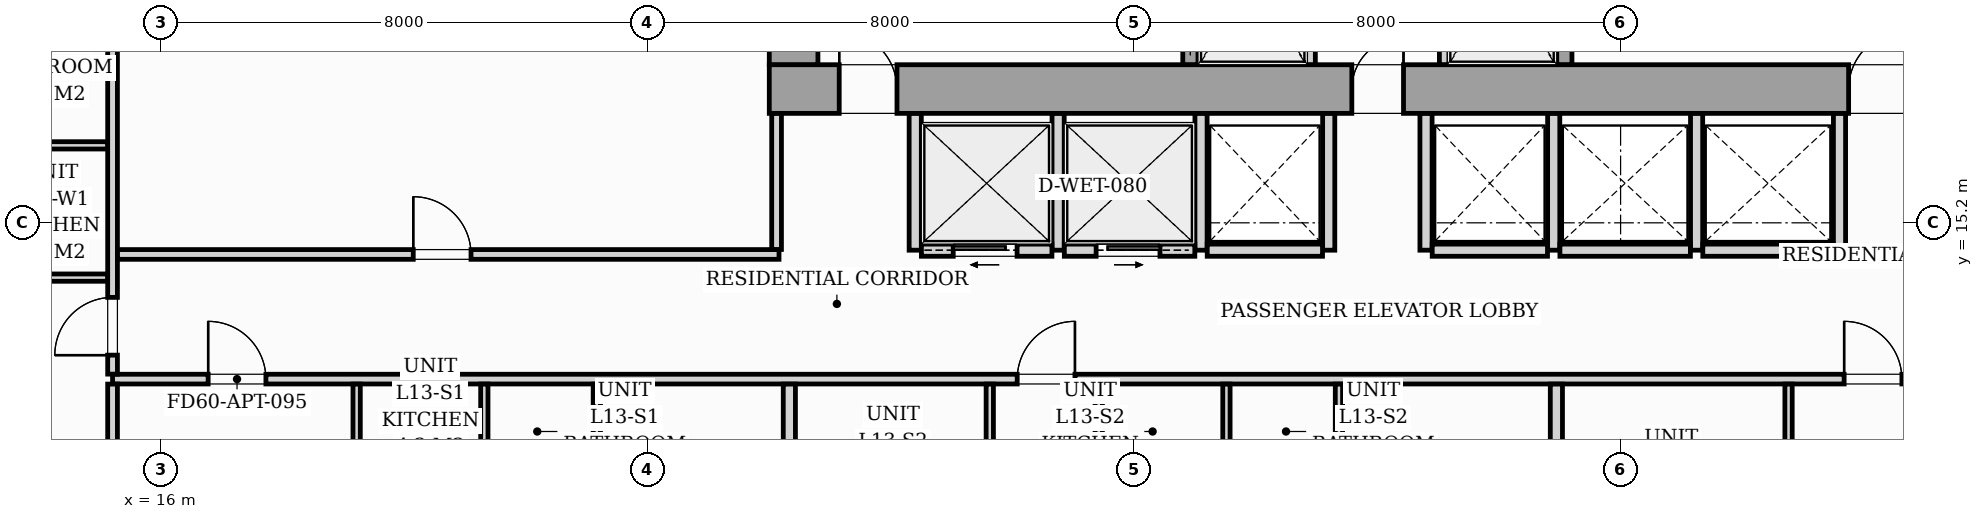
"""IFC4 building model, lengths in metres.
Left out: names, types, materials, properties, quantities, classifications, styles, units other than length and angle.
Written with IfcOpenShell. Run it as: python <this file> out.ifc"""

import sys

from ifc_helpers import new_model, si_unit, direction, frame, frame_2d, origin, origin_2d, place, context, subcontext, project, spatial, rectangle, i_section, extrude, source, transform, mapped, element, fill, save


model = new_model("IFC4")
c1 = context("Model", 3, precision=1e-05, world=origin(), true_north=direction((0.0, 1.0)))
c2 = subcontext(c1, "Body", "Model", "MODEL_VIEW")
j1 = project(units=[si_unit("LENGTHUNIT", "METRE"), si_unit("PLANEANGLEUNIT", "RADIAN")], contexts=[c1])
p1 = place(None, origin())
s1 = spatial("IfcSite", under=j1, at=p1, CompositionType="ELEMENT")
p2 = place(p1, origin())
s2 = spatial("IfcBuilding", under=s1, at=p2, CompositionType="ELEMENT")
p3 = place(p2, frame((0.0, 0.0, 48.6)))
s3 = spatial("IfcBuildingStorey", under=s2, at=p3, CompositionType="ELEMENT", Elevation=48.6)
m1 = source(origin(), c2, "Body", "SweptSolid", [
    extrude(i_section(OverallWidth=0.437, OverallDepth=0.514, WebThickness=0.061, FlangeThickness=0.097, FilletRadius=0.018, at=origin_2d()), origin(), (0.0, 0.0, 1.0), 3.196),
])
for number, where, z_axis, x_axis in (
    (1, (26.4, 17.4, 0.002), (0.0, 0.0, 1.0), (1.0, 0.0, 0.0)),
    (2, (33.12, 17.4, 0.002), (0.0, 0.0, 1.0), (1.0, 0.0, 0.0)),
    (3, (38.88, 17.4, 0.002), (0.0, 0.0, 1.0), (1.0, 0.0, 0.0)),
):
    element("IfcColumn", number, at=place(p3, frame(where, z_axis=z_axis, x_axis=x_axis)), inside=s3, PredefinedType="PILASTER", context=c2, shape_type="MappedRepresentation", body=[
        mapped(m1, transform((0.0, 0.0, 0.0), scale=1.0)),
    ])
p4 = place(p3, frame((26.0, 17.4, 0.0), z_axis=(0.0, 0.0, 1.0), x_axis=(1.0, 0.0, 0.0)))
e4 = element("IfcWall", 4, at=p4, inside=s3, PredefinedType="SHEAR", context=c2, shape_type="SweptSolid", body=[
    extrude(rectangle(XDim=20.0, YDim=0.8, at=frame_2d((10.0, 0.0))), origin(), (0.0, 0.0, 1.0), 3.2),
])
p5 = place(p4, frame((1.15, 0.0, 0.0)))
e5 = element("IfcOpeningElement", 5, at=p5, cuts=e4, PredefinedType="OPENING", context=c2, shape_type="SweptSolid", body=[
    extrude(rectangle(XDim=0.95, YDim=2.06, at=frame_2d((0.475, 1.03))), frame((0.0, 0.41, 0.0), z_axis=(0.0, -1.0, 0.0), x_axis=(1.0, 0.0, 0.0)), (0.0, 0.0, 1.0), 0.82),
])
p6 = place(p4, frame((9.58, 0.0, 0.0)))
e6 = element("IfcOpeningElement", 6, at=p6, cuts=e4, PredefinedType="OPENING", context=c2, shape_type="SweptSolid", body=[
    extrude(rectangle(XDim=0.85, YDim=2.0, at=frame_2d((0.425, 1.0))), frame((0.0, 0.41, 0.0), z_axis=(0.0, -1.0, 0.0), x_axis=(1.0, 0.0, 0.0)), (0.0, 0.0, 1.0), 0.82),
])
p7 = place(p4, frame((17.75, 0.0, 0.0)))
e7 = element("IfcOpeningElement", 7, at=p7, cuts=e4, PredefinedType="OPENING", context=c2, shape_type="SweptSolid", body=[
    extrude(rectangle(XDim=0.95, YDim=2.06, at=frame_2d((0.475, 1.03))), frame((0.0, 0.41, 0.0), z_axis=(0.0, -1.0, 0.0), x_axis=(1.0, 0.0, 0.0)), (0.0, 0.0, 1.0), 0.82),
])
p8 = place(p3, frame((26.4, 17.802, 0.0), z_axis=(0.0, 0.0, 1.0), x_axis=(0.0, 1.0, 0.0)))
e8 = element("IfcWall", 8, at=p8, inside=s3, PredefinedType="SHEAR", context=c2, shape_type="SweptSolid", body=[
    extrude(rectangle(XDim=5.796, YDim=0.8, at=frame_2d((2.898, 0.0))), origin(), (0.0, 0.0, 1.0), 3.2),
])
p9 = place(p3, frame((32.925, 17.802, 0.0), z_axis=(0.0, 0.0, 1.0), x_axis=(0.0, 1.0, 0.0)))
e9 = element("IfcWall", 9, at=p9, inside=s3, PredefinedType="SOLIDWALL", context=c2, shape_type="SweptSolid", body=[
    extrude(rectangle(XDim=2.646, YDim=0.25, at=frame_2d((1.323, 0.0))), origin(), (0.0, 0.0, 1.0), 3.2),
])
p10 = place(p9, frame((0.648, 0.0, 0.0)))
e10 = element("IfcOpeningElement", 10, at=p10, cuts=e9, PredefinedType="OPENING", context=c2, shape_type="SweptSolid", body=[
    extrude(rectangle(XDim=1.1, YDim=2.08, at=frame_2d((0.55, 1.04))), frame((0.0, 0.135, 0.0), z_axis=(0.0, -1.0, 0.0), x_axis=(1.0, 0.0, 0.0)), (0.0, 0.0, 1.0), 0.27),
])
for number, where, z_axis, x_axis in (
    (11, (34.9, 17.802, 0.0), (0.0, 0.0, 1.0), (0.0, 1.0, 0.0)),
    (12, (37.1, 17.802, 0.0), (0.0, 0.0, 1.0), (0.0, 1.0, 0.0)),
):
    element("IfcWall", number, at=place(p3, frame(where, z_axis=z_axis, x_axis=x_axis)), inside=s3, PredefinedType="PARTITIONING", context=c2, shape_type="SweptSolid", body=[
        extrude(rectangle(XDim=2.646, YDim=0.16, at=frame_2d((1.323, 0.0))), origin(), (0.0, 0.0, 1.0), 2.94),
    ])
p11 = place(p3, frame((39.075, 17.802, 0.0), z_axis=(0.0, 0.0, 1.0), x_axis=(0.0, 1.0, 0.0)))
e13 = element("IfcWall", 13, at=p11, inside=s3, PredefinedType="SOLIDWALL", context=c2, shape_type="SweptSolid", body=[
    extrude(rectangle(XDim=2.646, YDim=0.25, at=frame_2d((1.323, 0.0))), origin(), (0.0, 0.0, 1.0), 3.2),
])
p12 = place(p11, frame((0.648, 0.0, 0.0)))
e14 = element("IfcOpeningElement", 14, at=p12, cuts=e13, PredefinedType="OPENING", context=c2, shape_type="SweptSolid", body=[
    extrude(rectangle(XDim=1.1, YDim=2.08, at=frame_2d((0.55, 1.04))), frame((0.0, 0.135, 0.0), z_axis=(0.0, -1.0, 0.0), x_axis=(1.0, 0.0, 0.0)), (0.0, 0.0, 1.0), 0.27),
])
for number, where, z_axis, x_axis in (
    (15, (28.4, 14.75, 0.0), (0.0, 0.0, 1.0), (0.0, 1.0, 0.0)),
    (16, (30.75, 14.75, 0.0), (0.0, 0.0, 1.0), (0.0, 1.0, 0.0)),
    (17, (33.1, 14.75, 0.0), (0.0, 0.0, 1.0), (0.0, 1.0, 0.0)),
):
    element("IfcWall", number, at=place(p3, frame(where, z_axis=z_axis, x_axis=x_axis)), inside=s3, PredefinedType="PARTITIONING", context=c2, shape_type="SweptSolid", body=[
        extrude(rectangle(XDim=2.248, YDim=0.2, at=frame_2d((1.124, 0.0))), origin(), (0.0, 0.0, 1.0), 2.94),
    ])
p13 = place(p3, frame((28.502, 14.75, 0.0), z_axis=(0.0, 0.0, 1.0), x_axis=(1.0, 0.0, 0.0)))
e18 = element("IfcWall", 18, at=p13, inside=s3, PredefinedType="PARTITIONING", context=c2, shape_type="SweptSolid", body=[
    extrude(rectangle(XDim=2.146, YDim=0.2, at=frame_2d((1.073, 0.0))), origin(), (0.0, 0.0, 1.0), 2.94),
])
p14 = place(p13, frame((0.523, 0.0, 0.0)))
e19 = element("IfcOpeningElement", 19, at=p14, cuts=e18, PredefinedType="OPENING", context=c2, shape_type="SweptSolid", body=[
    extrude(rectangle(XDim=1.05, YDim=2.08, at=frame_2d((0.525, 1.04))), frame((0.0, 0.11, 0.0), z_axis=(0.0, -1.0, 0.0), x_axis=(1.0, 0.0, 0.0)), (0.0, 0.0, 1.0), 0.22),
])
p15 = place(p3, frame((30.852, 14.75, 0.0), z_axis=(0.0, 0.0, 1.0), x_axis=(1.0, 0.0, 0.0)))
e20 = element("IfcWall", 20, at=p15, inside=s3, PredefinedType="PARTITIONING", context=c2, shape_type="SweptSolid", body=[
    extrude(rectangle(XDim=2.146, YDim=0.2, at=frame_2d((1.073, 0.0))), origin(), (0.0, 0.0, 1.0), 2.94),
])
p16 = place(p15, frame((0.523, 0.0, 0.0)))
e21 = element("IfcOpeningElement", 21, at=p16, cuts=e20, PredefinedType="OPENING", context=c2, shape_type="SweptSolid", body=[
    extrude(rectangle(XDim=1.05, YDim=2.08, at=frame_2d((0.525, 1.04))), frame((0.0, 0.11, 0.0), z_axis=(0.0, -1.0, 0.0), x_axis=(1.0, 0.0, 0.0)), (0.0, 0.0, 1.0), 0.22),
])
p17 = place(p3, frame((35.2, 14.75, 0.0), z_axis=(0.0, 0.0, 1.0), x_axis=(0.0, 1.0, 0.0)))
e22 = element("IfcWall", 22, at=p17, inside=s3, PredefinedType="PARTITIONING", context=c2, shape_type="SweptSolid", body=[
    extrude(rectangle(XDim=2.248, YDim=0.2, at=frame_2d((1.124, 0.0))), origin(), (0.0, 0.0, 1.0), 2.94),
])
p18 = place(p3, frame((33.202, 14.75, 0.0), z_axis=(0.0, 0.0, 1.0), x_axis=(1.0, 0.0, 0.0)))
e23 = element("IfcWall", 23, at=p18, inside=s3, PredefinedType="PARTITIONING", context=c2, shape_type="SweptSolid", body=[
    extrude(rectangle(XDim=1.896, YDim=0.2, at=frame_2d((0.948, 0.0))), origin(), (0.0, 0.0, 1.0), 2.94),
])
for number, where, z_axis, x_axis in (
    (24, (36.8, 14.75, 0.0), (0.0, 0.0, 1.0), (0.0, 1.0, 0.0)),
    (25, (38.9, 14.75, 0.0), (0.0, 0.0, 1.0), (0.0, 1.0, 0.0)),
):
    element("IfcWall", number, at=place(p3, frame(where, z_axis=z_axis, x_axis=x_axis)), inside=s3, PredefinedType="PARTITIONING", context=c2, shape_type="SweptSolid", body=[
        extrude(rectangle(XDim=2.248, YDim=0.2, at=frame_2d((1.124, 0.0))), origin(), (0.0, 0.0, 1.0), 2.94),
    ])
p19 = place(p3, frame((36.902, 14.75, 0.0), z_axis=(0.0, 0.0, 1.0), x_axis=(1.0, 0.0, 0.0)))
e26 = element("IfcWall", 26, at=p19, inside=s3, PredefinedType="PARTITIONING", context=c2, shape_type="SweptSolid", body=[
    extrude(rectangle(XDim=1.896, YDim=0.2, at=frame_2d((0.948, 0.0))), origin(), (0.0, 0.0, 1.0), 2.94),
])
for number, where, z_axis, x_axis in (
    (27, (41.25, 14.75, 0.0), (0.0, 0.0, 1.0), (0.0, 1.0, 0.0)),
    (28, (43.6, 14.75, 0.0), (0.0, 0.0, 1.0), (0.0, 1.0, 0.0)),
):
    element("IfcWall", number, at=place(p3, frame(where, z_axis=z_axis, x_axis=x_axis)), inside=s3, PredefinedType="PARTITIONING", context=c2, shape_type="SweptSolid", body=[
        extrude(rectangle(XDim=2.248, YDim=0.2, at=frame_2d((1.124, 0.0))), origin(), (0.0, 0.0, 1.0), 2.94),
    ])
for number, where, z_axis, x_axis in (
    (29, (39.002, 14.75, 0.0), (0.0, 0.0, 1.0), (1.0, 0.0, 0.0)),
    (30, (41.352, 14.75, 0.0), (0.0, 0.0, 1.0), (1.0, 0.0, 0.0)),
):
    element("IfcWall", number, at=place(p3, frame(where, z_axis=z_axis, x_axis=x_axis)), inside=s3, PredefinedType="PARTITIONING", context=c2, shape_type="SweptSolid", body=[
        extrude(rectangle(XDim=2.146, YDim=0.2, at=frame_2d((1.073, 0.0))), origin(), (0.0, 0.0, 1.0), 2.94),
    ])
p20 = place(p3, frame((15.2, 12.63, 0.0), z_axis=(0.0, 0.0, 1.0), x_axis=(1.0, 0.0, 0.0)))
e31 = element("IfcWall", 31, at=p20, inside=s3, PredefinedType="PARTITIONING", context=c2, shape_type="SweptSolid", body=[
    extrude(rectangle(XDim=37.1, YDim=0.16, at=frame_2d((18.55, 0.0))), origin(), (0.0, 0.0, 1.0), 2.94),
])
p21 = place(p20, frame((1.572, 0.0, 0.0)))
e32 = element("IfcOpeningElement", 32, at=p21, cuts=e31, PredefinedType="OPENING", context=c2, shape_type="SweptSolid", body=[
    extrude(rectangle(XDim=0.95, YDim=2.06, at=frame_2d((0.475, 1.03))), frame((0.0, 0.09, 0.0), z_axis=(0.0, -1.0, 0.0), x_axis=(1.0, 0.0, 0.0)), (0.0, 0.0, 1.0), 0.18),
])
p22 = place(p20, frame((14.877, 0.0, 0.0)))
e33 = element("IfcOpeningElement", 33, at=p22, cuts=e31, PredefinedType="OPENING", context=c2, shape_type="SweptSolid", body=[
    extrude(rectangle(XDim=0.95, YDim=2.06, at=frame_2d((0.475, 1.03))), frame((0.0, 0.09, 0.0), z_axis=(0.0, -1.0, 0.0), x_axis=(1.0, 0.0, 0.0)), (0.0, 0.0, 1.0), 0.18),
])
p23 = place(p20, frame((28.476, 0.0, 0.0)))
e34 = element("IfcOpeningElement", 34, at=p23, cuts=e31, PredefinedType="OPENING", context=c2, shape_type="SweptSolid", body=[
    extrude(rectangle(XDim=0.95, YDim=2.06, at=frame_2d((0.475, 1.03))), frame((0.0, 0.09, 0.0), z_axis=(0.0, -1.0, 0.0), x_axis=(1.0, 0.0, 0.0)), (0.0, 0.0, 1.0), 0.18),
])
p24 = place(p3, frame((15.2, 2.962, 0.0), z_axis=(0.0, 0.0, 1.0), x_axis=(0.0, 1.0, 0.0)))
e35 = element("IfcWall", 35, at=p24, inside=s3, PredefinedType="PARTITIONING", context=c2, shape_type="SweptSolid", body=[
    extrude(rectangle(XDim=9.586, YDim=0.16, at=frame_2d((4.793, 0.0))), origin(), (0.0, 0.0, 1.0), 2.94),
])
p25 = place(p3, frame((15.2, 12.712, 0.0), z_axis=(0.0, 0.0, 1.0), x_axis=(0.0, 1.0, 0.0)))
e36 = element("IfcWall", 36, at=p25, inside=s3, PredefinedType="PARTITIONING", context=c2, shape_type="SweptSolid", body=[
    extrude(rectangle(XDim=14.726, YDim=0.16, at=frame_2d((7.363, 0.0))), origin(), (0.0, 0.0, 1.0), 2.94),
])
p26 = place(p25, frame((0.312, 0.0, 0.0)))
e37 = element("IfcOpeningElement", 37, at=p26, cuts=e36, PredefinedType="OPENING", context=c2, shape_type="SweptSolid", body=[
    extrude(rectangle(XDim=0.95, YDim=2.06, at=frame_2d((0.475, 1.03))), frame((0.0, 0.09, 0.0), z_axis=(0.0, -1.0, 0.0), x_axis=(1.0, 0.0, 0.0)), (0.0, 0.0, 1.0), 0.18),
])
p27 = place(p3, frame((23.164, 2.962, 0.0), z_axis=(0.0, 0.0, 1.0), x_axis=(0.0, 1.0, 0.0)))
e38 = element("IfcWall", 38, at=p27, inside=s3, PredefinedType="PARTITIONING", context=c2, shape_type="SweptSolid", body=[
    extrude(rectangle(XDim=9.586, YDim=0.12, at=frame_2d((4.793, 0.0))), origin(), (0.0, 0.0, 1.0), 2.94),
])
p28 = place(p27, frame((6.318, 0.0, 0.0)))
e39 = element("IfcOpeningElement", 39, at=p28, cuts=e38, PredefinedType="OPENING", context=c2, shape_type="SweptSolid", body=[
    extrude(rectangle(XDim=0.9, YDim=2.05, at=frame_2d((0.45, 1.025))), frame((0.0, 0.07, 0.0), z_axis=(0.0, -1.0, 0.0), x_axis=(1.0, 0.0, 0.0)), (0.0, 0.0, 1.0), 0.14),
])
for number, where, z_axis, x_axis in (
    (40, (21.314, 10.442, 0.0), (0.0, 0.0, 1.0), (0.0, 1.0, 0.0)),
    (41, (19.214, 10.442, 0.0), (0.0, 0.0, 1.0), (0.0, 1.0, 0.0)),
):
    element("IfcWall", number, at=place(p3, frame(where, z_axis=z_axis, x_axis=x_axis)), inside=s3, PredefinedType="PARTITIONING", context=c2, shape_type="SweptSolid", body=[
        extrude(rectangle(XDim=2.106, YDim=0.12, at=frame_2d((1.053, 0.0))), origin(), (0.0, 0.0, 1.0), 2.94),
    ])
p29 = place(p3, frame((26.33, 2.78, 0.0), z_axis=(0.0, 0.0, 1.0), x_axis=(0.0, 1.0, 0.0)))
e42 = element("IfcWall", 42, at=p29, inside=s3, PredefinedType="PARTITIONING", context=c2, shape_type="SweptSolid", body=[
    extrude(rectangle(XDim=9.768, YDim=0.2, at=frame_2d((4.884, 0.0))), origin(), (0.0, 0.0, 1.0), 2.94),
])
p30 = place(p3, frame((35.368, 2.78, 0.0), z_axis=(0.0, 0.0, 1.0), x_axis=(0.0, 1.0, 0.0)))
e43 = element("IfcWall", 43, at=p30, inside=s3, PredefinedType="PARTITIONING", context=c2, shape_type="SweptSolid", body=[
    extrude(rectangle(XDim=9.768, YDim=0.12, at=frame_2d((4.884, 0.0))), origin(), (0.0, 0.0, 1.0), 2.94),
])
p31 = place(p30, frame((6.5, 0.0, 0.0)))
e44 = element("IfcOpeningElement", 44, at=p31, cuts=e43, PredefinedType="OPENING", context=c2, shape_type="SweptSolid", body=[
    extrude(rectangle(XDim=0.9, YDim=2.05, at=frame_2d((0.45, 1.025))), frame((0.0, 0.07, 0.0), z_axis=(0.0, -1.0, 0.0), x_axis=(1.0, 0.0, 0.0)), (0.0, 0.0, 1.0), 0.14),
])
for number, where, z_axis, x_axis in (
    (45, (33.518, 10.442, 0.0), (0.0, 0.0, 1.0), (0.0, 1.0, 0.0)),
    (46, (31.418, 10.442, 0.0), (0.0, 0.0, 1.0), (0.0, 1.0, 0.0)),
):
    element("IfcWall", number, at=place(p3, frame(where, z_axis=z_axis, x_axis=x_axis)), inside=s3, PredefinedType="PARTITIONING", context=c2, shape_type="SweptSolid", body=[
        extrude(rectangle(XDim=2.106, YDim=0.12, at=frame_2d((1.053, 0.0))), origin(), (0.0, 0.0, 1.0), 2.94),
    ])
p32 = place(p3, frame((29.626, 2.78, 0.0), z_axis=(0.0, 0.0, 1.0), x_axis=(0.0, 1.0, 0.0)))
e47 = element("IfcWall", 47, at=p32, inside=s3, PredefinedType="PARTITIONING", context=c2, shape_type="SweptSolid", body=[
    extrude(rectangle(XDim=9.768, YDim=0.12, at=frame_2d((4.884, 0.0))), origin(), (0.0, 0.0, 1.0), 2.94),
])
p33 = place(p32, frame((4.54, 0.0, 0.0)))
e48 = element("IfcOpeningElement", 48, at=p33, cuts=e47, PredefinedType="OPENING", context=c2, shape_type="SweptSolid", body=[
    extrude(rectangle(XDim=0.85, YDim=2.05, at=frame_2d((0.425, 1.025))), frame((0.0, 0.07, 0.0), z_axis=(0.0, -1.0, 0.0), x_axis=(1.0, 0.0, 0.0)), (0.0, 0.0, 1.0), 0.14),
])
p34 = place(p3, frame((38.944, 2.78, 0.0), z_axis=(0.0, 0.0, 1.0), x_axis=(0.0, 1.0, 0.0)))
e49 = element("IfcWall", 49, at=p34, inside=s3, PredefinedType="PARTITIONING", context=c2, shape_type="SweptSolid", body=[
    extrude(rectangle(XDim=9.768, YDim=0.2, at=frame_2d((4.884, 0.0))), origin(), (0.0, 0.0, 1.0), 2.94),
])
p35 = place(p3, frame((42.762, 2.962, 0.0), z_axis=(0.0, 0.0, 1.0), x_axis=(0.0, 1.0, 0.0)))
e50 = element("IfcWall", 50, at=p35, inside=s3, PredefinedType="PARTITIONING", context=c2, shape_type="SweptSolid", body=[
    extrude(rectangle(XDim=9.586, YDim=0.12, at=frame_2d((4.793, 0.0))), origin(), (0.0, 0.0, 1.0), 2.94),
])
p36 = place(p35, frame((4.358, 0.0, 0.0)))
e51 = element("IfcOpeningElement", 51, at=p36, cuts=e50, PredefinedType="OPENING", context=c2, shape_type="SweptSolid", body=[
    extrude(rectangle(XDim=0.85, YDim=2.05, at=frame_2d((0.425, 1.025))), frame((0.0, 0.07, 0.0), z_axis=(0.0, -1.0, 0.0), x_axis=(1.0, 0.0, 0.0)), (0.0, 0.0, 1.0), 0.14),
])
for number, where, z_axis, x_axis in (
    (52, (12.862, 16.474, 0.0), (0.0, 0.0, 1.0), (1.0, 0.0, 0.0)),
    (53, (12.862, 14.299, 0.0), (0.0, 0.0, 1.0), (1.0, 0.0, 0.0)),
):
    element("IfcWall", number, at=place(p3, frame(where, z_axis=z_axis, x_axis=x_axis)), inside=s3, PredefinedType="PARTITIONING", context=c2, shape_type="SweptSolid", body=[
        extrude(rectangle(XDim=2.256, YDim=0.12, at=frame_2d((1.128, 0.0))), origin(), (0.0, 0.0, 1.0), 2.94),
    ])
p37 = place(p3, frame((15.282, 14.68, 0.0), z_axis=(0.0, 0.0, 1.0), x_axis=(1.0, 0.0, 0.0)))
e54 = element("IfcWall", 54, at=p37, inside=s3, PredefinedType="PARTITIONING", context=c2, shape_type="SweptSolid", body=[
    extrude(rectangle(XDim=10.878, YDim=0.16, at=frame_2d((5.439, 0.0))), origin(), (0.0, 0.0, 1.0), 2.94),
])
p38 = place(p37, frame((4.863, 0.0, 0.0)))
e55 = element("IfcOpeningElement", 55, at=p38, cuts=e54, PredefinedType="OPENING", context=c2, shape_type="SweptSolid", body=[
    extrude(rectangle(XDim=0.95, YDim=2.06, at=frame_2d((0.475, 1.03))), frame((0.0, 0.09, 0.0), z_axis=(0.0, -1.0, 0.0), x_axis=(1.0, 0.0, 0.0)), (0.0, 0.0, 1.0), 0.18),
])
p39 = place(p3, frame((26.12, 14.762, 0.0), z_axis=(0.0, 0.0, 1.0), x_axis=(0.0, 1.0, 0.0)))
e56 = element("IfcWall", 56, at=p39, inside=s3, PredefinedType="PARTITIONING", context=c2, shape_type="SweptSolid", body=[
    extrude(rectangle(XDim=2.236, YDim=0.16, at=frame_2d((1.118, 0.0))), origin(), (0.0, 0.0, 1.0), 2.94),
])
m2 = source(origin(), c2, "Body", "SweptSolid", [
    extrude(rectangle(XDim=0.95, YDim=2.06, at=frame_2d((0.475, 1.03))), frame((0.0, 0.025, 0.0), z_axis=(0.0, -1.0, 0.0), x_axis=(1.0, 0.0, 0.0)), (0.0, 0.0, 1.0), 0.05),
])
p40 = place(p5, origin())
e57 = element("IfcDoor", 57, at=p40, inside=s3, OperationType="SINGLE_SWING_LEFT", PredefinedType="DOOR", context=c2, shape_type="MappedRepresentation", body=[
    mapped(m2, transform((0.0, 0.0, 0.0), scale=1.0)),
])
fill(e5, e57)
m3 = source(origin(), c2, "Body", "SweptSolid", [
    extrude(rectangle(XDim=0.85, YDim=2.0, at=frame_2d((0.425, 1.0))), frame((0.0, 0.025, 0.0), z_axis=(0.0, -1.0, 0.0), x_axis=(1.0, 0.0, 0.0)), (0.0, 0.0, 1.0), 0.05),
])
p41 = place(p6, origin())
e58 = element("IfcDoor", 58, at=p41, inside=s3, OperationType="SINGLE_SWING_RIGHT", PredefinedType="DOOR", context=c2, shape_type="MappedRepresentation", body=[
    mapped(m3, transform((0.0, 0.0, 0.0), scale=1.0)),
])
fill(e6, e58)
p42 = place(p7, origin())
e59 = element("IfcDoor", 59, at=p42, inside=s3, OperationType="SINGLE_SWING_RIGHT", PredefinedType="DOOR", context=c2, shape_type="MappedRepresentation", body=[
    mapped(m2, transform((0.0, 0.0, 0.0), scale=1.0)),
])
fill(e7, e59)
m4 = source(origin(), c2, "Body", "SweptSolid", [
    extrude(rectangle(XDim=1.05, YDim=2.08, at=frame_2d((0.525, 1.04))), frame((0.0, 0.025, 0.0), z_axis=(0.0, -1.0, 0.0), x_axis=(1.0, 0.0, 0.0)), (0.0, 0.0, 1.0), 0.05),
])
p43 = place(p14, origin())
e60 = element("IfcDoor", 60, at=p43, inside=s3, OperationType="SLIDING_TO_LEFT", PredefinedType="DOOR", context=c2, shape_type="MappedRepresentation", body=[
    mapped(m4, transform((0.0, 0.0, 0.0), scale=1.0)),
])
fill(e19, e60)
p44 = place(p16, origin())
e61 = element("IfcDoor", 61, at=p44, inside=s3, OperationType="SLIDING_TO_RIGHT", PredefinedType="DOOR", context=c2, shape_type="MappedRepresentation", body=[
    mapped(m4, transform((0.0, 0.0, 0.0), scale=1.0)),
])
fill(e21, e61)
m5 = source(origin(), c2, "Body", "SweptSolid", [
    extrude(rectangle(XDim=0.95, YDim=2.06, at=frame_2d((0.475, 1.03))), frame((0.0, 0.025, 0.0), z_axis=(0.0, -1.0, 0.0), x_axis=(1.0, 0.0, 0.0)), (0.0, 0.0, 1.0), 0.05),
])
p45 = place(p21, origin())
e62 = element("IfcDoor", 62, at=p45, inside=s3, OperationType="SINGLE_SWING_LEFT", PredefinedType="DOOR", context=c2, shape_type="MappedRepresentation", body=[
    mapped(m5, transform((0.0, 0.0, 0.0), scale=1.0)),
])
fill(e32, e62)
p46 = place(p22, origin())
e63 = element("IfcDoor", 63, at=p46, inside=s3, OperationType="SINGLE_SWING_RIGHT", PredefinedType="DOOR", context=c2, shape_type="MappedRepresentation", body=[
    mapped(m5, transform((0.0, 0.0, 0.0), scale=1.0)),
])
fill(e33, e63)
p47 = place(p23, origin())
e64 = element("IfcDoor", 64, at=p47, inside=s3, OperationType="SINGLE_SWING_LEFT", PredefinedType="DOOR", context=c2, shape_type="MappedRepresentation", body=[
    mapped(m5, transform((0.0, 0.0, 0.0), scale=1.0)),
])
fill(e34, e64)
p48 = place(p26, origin())
e65 = element("IfcDoor", 65, at=p48, inside=s3, OperationType="SINGLE_SWING_LEFT", PredefinedType="DOOR", context=c2, shape_type="MappedRepresentation", body=[
    mapped(m5, transform((0.0, 0.0, 0.0), scale=1.0)),
])
fill(e37, e65)
p49 = place(p38, origin())
e66 = element("IfcDoor", 66, at=p49, inside=s3, OperationType="SINGLE_SWING_LEFT", PredefinedType="DOOR", context=c2, shape_type="MappedRepresentation", body=[
    mapped(m5, transform((0.0, 0.0, 0.0), scale=1.0)),
])
fill(e55, e66)
save(model, sys.argv[1])
